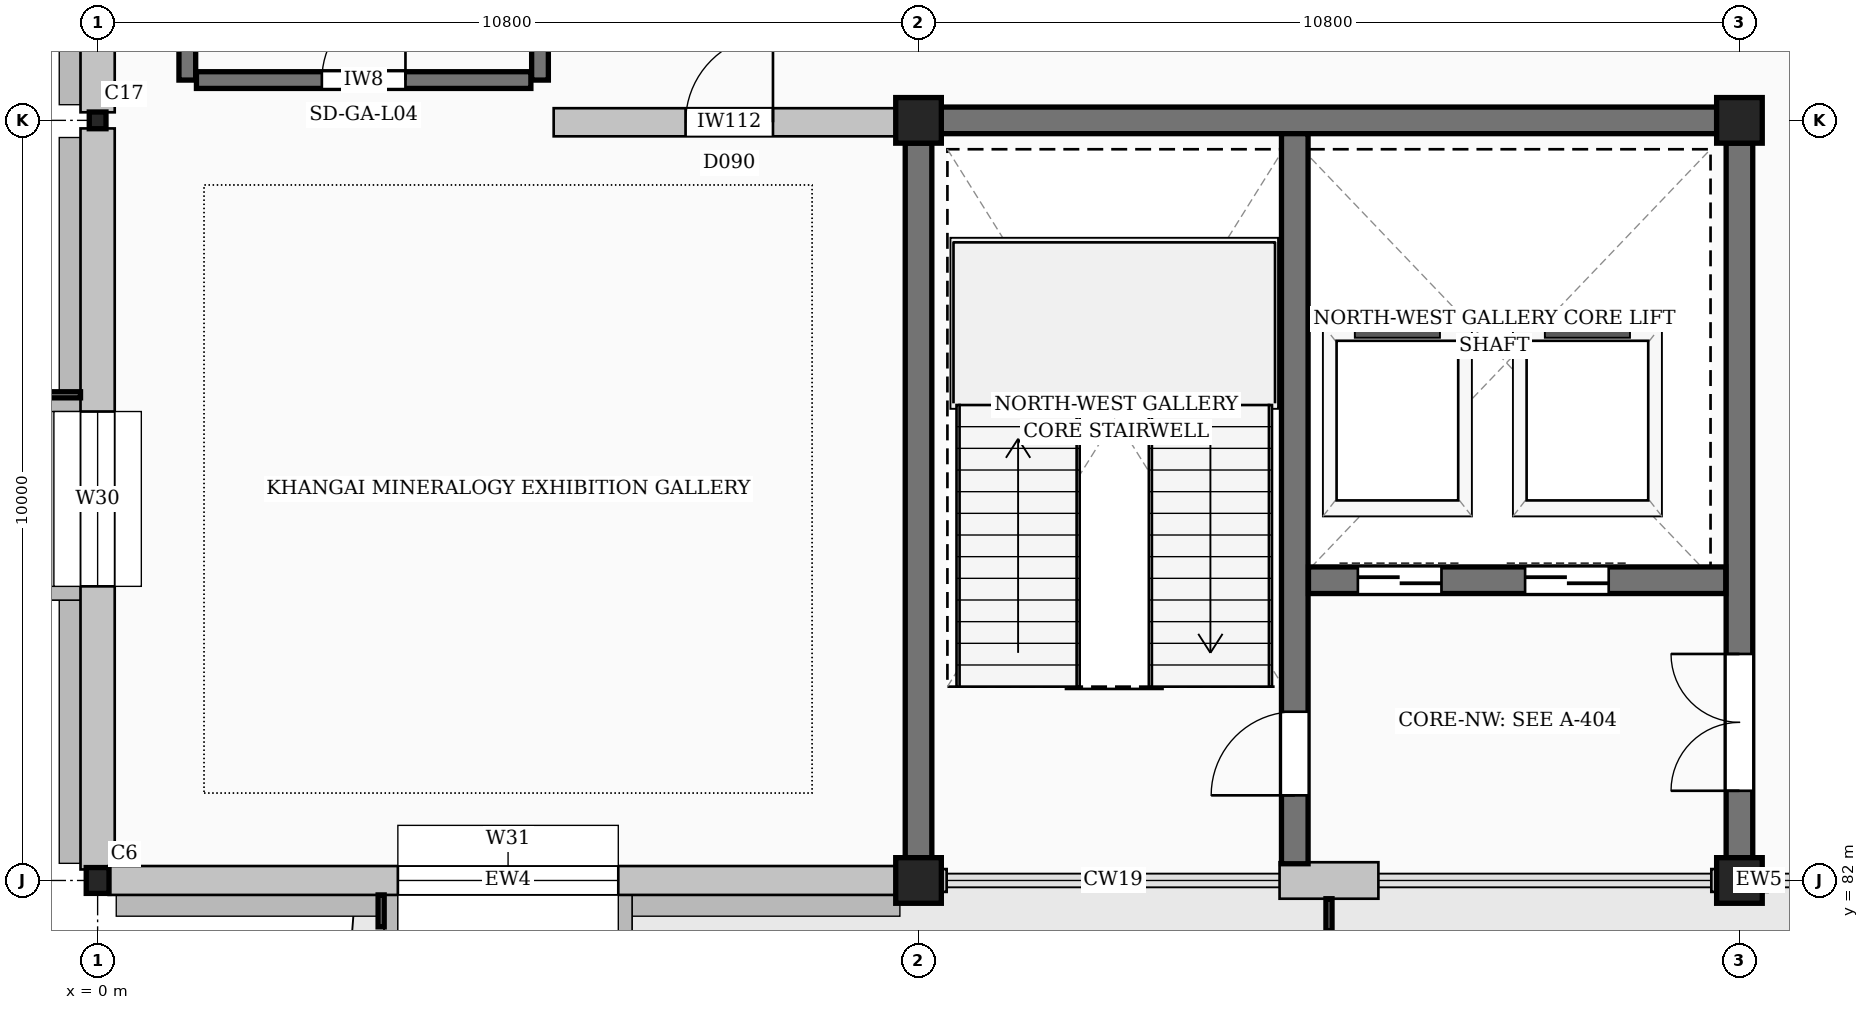
"""IFC4 building model, lengths in metres.
Left out: names, types, materials, properties, quantities, classifications, styles, units other than length and angle.
Written with IfcOpenShell. Run it as: python <this file> out.ifc"""

import sys

from ifc_helpers import new_model, si_unit, direction, frame, frame_2d, origin, origin_2d, place, context, subcontext, project, spatial, rectangle, hollow_rectangle, i_section, extrude, element, fill, save


model = new_model("IFC4")
c1 = context("Model", 3, precision=1e-05, world=origin(), true_north=direction((0.0, 1.0)))
c2 = subcontext(c1, "Body", "Model", "MODEL_VIEW")
j1 = project(units=[si_unit("LENGTHUNIT", "METRE"), si_unit("PLANEANGLEUNIT", "RADIAN")], contexts=[c1])
p1 = place(None, origin())
s1 = spatial("IfcSite", under=j1, at=p1, CompositionType="ELEMENT")
p2 = place(p1, origin())
s2 = spatial("IfcBuilding", under=s1, at=p2, CompositionType="ELEMENT")
p3 = place(p2, frame((0.0, 0.0, 24.0)))
s3 = spatial("IfcBuildingStorey", under=s2, at=p3, CompositionType="ELEMENT", Elevation=24.0)
p4 = place(p3, frame((0.0, 82.0, 0.0), z_axis=(0.0, 0.0, 1.0), x_axis=(1.0, 0.0, 0.0)))
e1 = element("IfcColumn", 1, at=p4, inside=s3, PredefinedType="COLUMN", context=c2, shape_type="SweptSolid", body=[
    extrude(i_section(OverallWidth=0.3, OverallDepth=0.34, WebThickness=0.012, FlangeThickness=0.021, FilletRadius=0.027, at=origin_2d()), origin(), (0.0, 0.0, 1.0), 4.8),
])
p5 = place(p3, frame((0.0, 92.0, 0.0), z_axis=(0.0, 0.0, 1.0), x_axis=(1.0, 0.0, 0.0)))
e2 = element("IfcColumn", 2, at=p5, inside=s3, PredefinedType="COLUMN", context=c2, shape_type="SweptSolid", body=[
    extrude(hollow_rectangle(XDim=0.22, YDim=0.22, WallThickness=0.012, InnerFilletRadius=0.012, OuterFilletRadius=0.025, at=origin_2d()), origin(), (0.0, 0.0, 1.0), 4.8),
])
for number, where, z_axis, x_axis in (
    (3, (10.8, 82.0, 0.0), (0.0, 0.0, 1.0), (1.0, 0.0, 0.0)),
    (4, (10.8, 92.0, 0.0), (0.0, 0.0, 1.0), (1.0, 0.0, 0.0)),
    (5, (21.6, 82.0, 0.0), (0.0, 0.0, 1.0), (1.0, 0.0, 0.0)),
    (6, (21.6, 92.0, 0.0), (0.0, 0.0, 1.0), (1.0, 0.0, 0.0)),
):
    element("IfcColumn", number, at=place(p3, frame(where, z_axis=z_axis, x_axis=x_axis)), inside=s3, PredefinedType="COLUMN", context=c2, shape_type="SweptSolid", body=[
        extrude(rectangle(XDim=0.6, YDim=0.6, at=origin_2d()), origin(), (0.0, 0.0, 1.0), 4.8),
    ])
p6 = place(p3, frame((0.0, 101.894, 0.0), z_axis=(0.0, 0.0, 1.0), x_axis=(0.0, -1.0, 0.0)))
e7 = element("IfcWall", 7, at=p6, inside=s3, PredefinedType="STANDARD", context=c2, shape_type="SweptSolid", body=[
    extrude(rectangle(XDim=9.788, YDim=0.45, at=frame_2d((4.894, 0.0))), origin(), (0.0, 0.0, 1.0), 4.56),
])
p7 = place(p6, frame((3.144, 0.0, 1.0)))
e8 = element("IfcOpeningElement", 8, at=p7, cuts=e7, PredefinedType="OPENING", context=c2, shape_type="SweptSolid", body=[
    extrude(rectangle(XDim=3.5, YDim=2.3, at=frame_2d((1.75, 1.15))), frame((0.0, 0.235, 0.0), z_axis=(0.0, -1.0, 0.0), x_axis=(1.0, 0.0, 0.0)), (0.0, 0.0, 1.0), 0.47),
])
p8 = place(p3, frame((0.0, 91.894, 0.0), z_axis=(0.0, 0.0, 1.0), x_axis=(0.0, -1.0, 0.0)))
e9 = element("IfcWall", 9, at=p8, inside=s3, PredefinedType="STANDARD", context=c2, shape_type="SweptSolid", body=[
    extrude(rectangle(XDim=9.749, YDim=0.45, at=frame_2d((4.875, 0.0))), origin(), (0.0, 0.0, 1.0), 4.56),
])
p9 = place(p8, frame((3.725, 0.0, 1.0)))
e10 = element("IfcOpeningElement", 10, at=p9, cuts=e9, PredefinedType="OPENING", context=c2, shape_type="SweptSolid", body=[
    extrude(rectangle(XDim=2.3, YDim=2.3, at=frame_2d((1.15, 1.15))), frame((0.0, 0.235, 0.0), z_axis=(0.0, -1.0, 0.0), x_axis=(1.0, 0.0, 0.0)), (0.0, 0.0, 1.0), 0.47),
])
p10 = place(p3, frame((0.145, 82.0, 0.0), z_axis=(0.0, 0.0, 1.0), x_axis=(1.0, 0.0, 0.0)))
e11 = element("IfcWall", 11, at=p10, inside=s3, PredefinedType="STANDARD", context=c2, shape_type="SweptSolid", body=[
    extrude(rectangle(XDim=10.51, YDim=0.38, at=frame_2d((5.255, 0.0))), origin(), (0.0, 0.0, 1.0), 4.17),
])
p11 = place(p10, frame((3.805, 0.0, 1.0)))
e12 = element("IfcOpeningElement", 12, at=p11, cuts=e11, PredefinedType="OPENING", context=c2, shape_type="SweptSolid", body=[
    extrude(rectangle(XDim=2.9, YDim=2.5, at=frame_2d((1.45, 1.25))), frame((0.0, 0.2, 0.0), z_axis=(0.0, -1.0, 0.0), x_axis=(1.0, 0.0, 0.0)), (0.0, 0.0, 1.0), 0.4),
])
p12 = place(p3, frame((15.55, 82.0, 0.0), z_axis=(0.0, 0.0, 1.0), x_axis=(1.0, 0.0, 0.0)))
e13 = element("IfcWall", 13, at=p12, inside=s3, PredefinedType="STANDARD", context=c2, shape_type="SweptSolid", body=[
    extrude(rectangle(XDim=1.3, YDim=0.48, at=frame_2d((0.65, 0.0))), origin(), (0.0, 0.0, 1.0), 4.17),
])
p13 = place(p3, frame((10.945, 82.0, 0.0), z_axis=(0.0, 0.0, 1.0), x_axis=(1.0, 0.0, 0.0)))
e14 = element("IfcWall", 14, at=p13, inside=s3, PredefinedType="STANDARD", context=c2, shape_type="SweptSolid", body=[
    extrude(rectangle(XDim=0.225, YDim=0.3, at=frame_2d((0.112, 0.0))), origin(), (0.0, 0.0, 1.0), 4.56),
])
p14 = place(p3, frame((21.23, 82.0, 0.0), z_axis=(0.0, 0.0, 1.0), x_axis=(1.0, 0.0, 0.0)))
e15 = element("IfcWall", 15, at=p14, inside=s3, PredefinedType="STANDARD", context=c2, shape_type="SweptSolid", body=[
    extrude(rectangle(XDim=0.225, YDim=0.3, at=frame_2d((0.113, 0.0))), origin(), (0.0, 0.0, 1.0), 4.56),
])
p15 = place(p3, frame((21.745, 82.0, 0.0), z_axis=(0.0, 0.0, 1.0), x_axis=(1.0, 0.0, 0.0)))
e16 = element("IfcWall", 16, at=p15, inside=s3, PredefinedType="STANDARD", context=c2, shape_type="SweptSolid", body=[
    extrude(rectangle(XDim=0.225, YDim=0.3, at=frame_2d((0.112, 0.0))), origin(), (0.0, 0.0, 1.0), 4.56),
])
p16 = place(p3, frame((11.1, 92.0, 0.0), z_axis=(0.0, 0.0, 1.0), x_axis=(1.0, 0.0, 0.0)))
e17 = element("IfcWall", 17, at=p16, inside=s3, PredefinedType="SHEAR", context=c2, shape_type="SweptSolid", body=[
    extrude(rectangle(XDim=10.2, YDim=0.35, at=frame_2d((5.1, 0.0))), origin(), (0.0, 0.0, 1.0), 4.56),
])
p17 = place(p3, frame((10.8, 82.3, 0.0), z_axis=(0.0, 0.0, 1.0), x_axis=(0.0, 1.0, 0.0)))
e18 = element("IfcWall", 18, at=p17, inside=s3, PredefinedType="SHEAR", context=c2, shape_type="SweptSolid", body=[
    extrude(rectangle(XDim=9.4, YDim=0.35, at=frame_2d((4.7, 0.0))), origin(), (0.0, 0.0, 1.0), 4.56),
])
p18 = place(p3, frame((21.6, 82.3, 0.0), z_axis=(0.0, 0.0, 1.0), x_axis=(0.0, 1.0, 0.0)))
e19 = element("IfcWall", 19, at=p18, inside=s3, PredefinedType="SHEAR", context=c2, shape_type="SweptSolid", body=[
    extrude(rectangle(XDim=9.4, YDim=0.35, at=frame_2d((4.7, 0.0))), origin(), (0.0, 0.0, 1.0), 4.56),
])
p19 = place(p18, frame((0.88, 0.0, 0.0)))
e20 = element("IfcOpeningElement", 20, at=p19, cuts=e19, PredefinedType="OPENING", context=c2, shape_type="SweptSolid", body=[
    extrude(rectangle(XDim=1.8, YDim=2.25, at=frame_2d((0.9, 1.125))), frame((0.0, 0.185, 0.0), z_axis=(0.0, -1.0, 0.0), x_axis=(1.0, 0.0, 0.0)), (0.0, 0.0, 1.0), 0.37),
])
p20 = place(p3, frame((15.75, 82.22, 0.0), z_axis=(0.0, 0.0, 1.0), x_axis=(0.0, 1.0, 0.0)))
e21 = element("IfcWall", 21, at=p20, inside=s3, PredefinedType="SHEAR", context=c2, shape_type="SweptSolid", body=[
    extrude(rectangle(XDim=9.605, YDim=0.35, at=frame_2d((4.802, 0.0))), origin(), (0.0, 0.0, 1.0), 4.56),
])
p21 = place(p20, frame((0.9, 0.0, 0.0)))
e22 = element("IfcOpeningElement", 22, at=p21, cuts=e21, PredefinedType="OPENING", context=c2, shape_type="SweptSolid", body=[
    extrude(rectangle(XDim=1.1, YDim=2.2, at=frame_2d((0.55, 1.1))), frame((0.0, 0.185, 0.0), z_axis=(0.0, -1.0, 0.0), x_axis=(1.0, 0.0, 0.0)), (0.0, 0.0, 1.0), 0.37),
])
p22 = place(p3, frame((15.93, 85.95, 0.0), z_axis=(0.0, 0.0, 1.0), x_axis=(1.0, 0.0, 0.0)))
e23 = element("IfcWall", 23, at=p22, inside=s3, PredefinedType="SHEAR", context=c2, shape_type="SweptSolid", body=[
    extrude(rectangle(XDim=5.49, YDim=0.35, at=frame_2d((2.745, 0.0))), origin(), (0.0, 0.0, 1.0), 4.56),
])
p23 = place(p22, frame((0.65, 0.0, 0.0)))
e24 = element("IfcOpeningElement", 24, at=p23, cuts=e23, PredefinedType="OPENING", context=c2, shape_type="SweptSolid", body=[
    extrude(rectangle(XDim=1.1, YDim=2.2, at=frame_2d((0.55, 1.1))), frame((0.0, 0.185, 0.0), z_axis=(0.0, -1.0, 0.0), x_axis=(1.0, 0.0, 0.0)), (0.0, 0.0, 1.0), 0.37),
])
p24 = place(p22, frame((2.85, 0.0, 0.0)))
e25 = element("IfcOpeningElement", 25, at=p24, cuts=e23, PredefinedType="OPENING", context=c2, shape_type="SweptSolid", body=[
    extrude(rectangle(XDim=1.1, YDim=2.2, at=frame_2d((0.55, 1.1))), frame((0.0, 0.185, 0.0), z_axis=(0.0, -1.0, 0.0), x_axis=(1.0, 0.0, 0.0)), (0.0, 0.0, 1.0), 0.37),
])
for number, where, z_axis, x_axis in (
    (26, (1.18, 92.53, 0.0), (0.0, 0.0, 1.0), (0.0, 1.0, 0.0)),
    (27, (5.82, 92.53, 0.0), (0.0, 0.0, 1.0), (0.0, 1.0, 0.0)),
):
    element("IfcWall", number, at=place(p3, frame(where, z_axis=z_axis, x_axis=x_axis)), inside=s3, PredefinedType="SHEAR", context=c2, shape_type="SweptSolid", body=[
        extrude(rectangle(XDim=9.14, YDim=0.22, at=frame_2d((4.57, 0.0))), origin(), (0.0, 0.0, 1.0), 4.56),
    ])
p25 = place(p3, frame((1.3, 92.53, 0.0), z_axis=(0.0, 0.0, 1.0), x_axis=(1.0, 0.0, 0.0)))
e28 = element("IfcWall", 28, at=p25, inside=s3, PredefinedType="SHEAR", context=c2, shape_type="SweptSolid", body=[
    extrude(rectangle(XDim=4.4, YDim=0.22, at=frame_2d((2.2, 0.0))), origin(), (0.0, 0.0, 1.0), 4.56),
])
p26 = place(p25, frame((1.65, 0.0, 0.0)))
e29 = element("IfcOpeningElement", 29, at=p26, cuts=e28, PredefinedType="OPENING", context=c2, shape_type="SweptSolid", body=[
    extrude(rectangle(XDim=1.1, YDim=2.2, at=frame_2d((0.55, 1.1))), frame((0.0, 0.12, 0.0), z_axis=(0.0, -1.0, 0.0), x_axis=(1.0, 0.0, 0.0)), (0.0, 0.0, 1.0), 0.24),
])
p27 = place(p3, frame((6.0, 91.975, 0.0), z_axis=(0.0, 0.0, 1.0), x_axis=(1.0, 0.0, 0.0)))
e30 = element("IfcWall", 30, at=p27, inside=s3, PredefinedType="PARTITIONING", context=c2, shape_type="SweptSolid", body=[
    extrude(rectangle(XDim=4.62, YDim=0.37, at=frame_2d((2.31, 0.0))), origin(), (0.0, 0.0, 1.0), 4.17),
])
p28 = place(p27, frame((1.735, 0.0, 0.0)))
e31 = element("IfcOpeningElement", 31, at=p28, cuts=e30, PredefinedType="OPENING", context=c2, shape_type="SweptSolid", body=[
    extrude(rectangle(XDim=1.15, YDim=2.25, at=frame_2d((0.575, 1.125))), frame((0.0, 0.195, 0.0), z_axis=(0.0, -1.0, 0.0), x_axis=(1.0, 0.0, 0.0)), (0.0, 0.0, 1.0), 0.39),
])
p29 = place(p9, origin())
e32 = element("IfcWindow", 32, at=p29, inside=s3, PartitioningType="SINGLE_PANEL", PredefinedType="WINDOW", context=c2, shape_type="SweptSolid", body=[
    extrude(rectangle(XDim=2.3, YDim=2.3, at=frame_2d((1.15, 1.15))), frame((0.0, 0.03, 0.0), z_axis=(0.0, -1.0, 0.0), x_axis=(1.0, 0.0, 0.0)), (0.0, 0.0, 1.0), 0.06),
])
fill(e10, e32)
p30 = place(p11, origin())
e33 = element("IfcWindow", 33, at=p30, inside=s3, PartitioningType="SINGLE_PANEL", PredefinedType="WINDOW", context=c2, shape_type="SweptSolid", body=[
    extrude(rectangle(XDim=2.9, YDim=2.5, at=frame_2d((1.45, 1.25))), frame((0.0, 0.03, 0.0), z_axis=(0.0, -1.0, 0.0), x_axis=(1.0, 0.0, 0.0)), (0.0, 0.0, 1.0), 0.06),
])
fill(e12, e33)
p31 = place(p21, origin())
e34 = element("IfcDoor", 34, at=p31, inside=s3, OperationType="SINGLE_SWING_LEFT", PredefinedType="DOOR", context=c2, shape_type="SweptSolid", body=[
    extrude(rectangle(XDim=1.1, YDim=2.2, at=frame_2d((0.55, 1.1))), frame((0.0, 0.025, 0.0), z_axis=(0.0, -1.0, 0.0), x_axis=(1.0, 0.0, 0.0)), (0.0, 0.0, 1.0), 0.05),
])
fill(e22, e34)
p32 = place(p19, origin())
e35 = element("IfcDoor", 35, at=p32, inside=s3, OperationType="DOUBLE_DOOR_SINGLE_SWING", PredefinedType="DOOR", context=c2, shape_type="SweptSolid", body=[
    extrude(rectangle(XDim=1.8, YDim=2.25, at=frame_2d((0.9, 1.125))), frame((0.0, 0.025, 0.0), z_axis=(0.0, -1.0, 0.0), x_axis=(1.0, 0.0, 0.0)), (0.0, 0.0, 1.0), 0.05),
])
fill(e20, e35)
p33 = place(p23, origin())
e36 = element("IfcDoor", 36, at=p33, inside=s3, OperationType="DOUBLE_DOOR_SLIDING", PredefinedType="DOOR", context=c2, shape_type="SweptSolid", body=[
    extrude(rectangle(XDim=1.1, YDim=2.2, at=frame_2d((0.55, 1.1))), frame((0.0, 0.025, 0.0), z_axis=(0.0, -1.0, 0.0), x_axis=(1.0, 0.0, 0.0)), (0.0, 0.0, 1.0), 0.05),
])
fill(e24, e36)
p34 = place(p24, origin())
e37 = element("IfcDoor", 37, at=p34, inside=s3, OperationType="DOUBLE_DOOR_SLIDING", PredefinedType="DOOR", context=c2, shape_type="SweptSolid", body=[
    extrude(rectangle(XDim=1.1, YDim=2.2, at=frame_2d((0.55, 1.1))), frame((0.0, 0.025, 0.0), z_axis=(0.0, -1.0, 0.0), x_axis=(1.0, 0.0, 0.0)), (0.0, 0.0, 1.0), 0.05),
])
fill(e25, e37)
p35 = place(p26, origin())
e38 = element("IfcDoor", 38, at=p35, inside=s3, OperationType="SINGLE_SWING_RIGHT", PredefinedType="DOOR", context=c2, shape_type="SweptSolid", body=[
    extrude(rectangle(XDim=1.1, YDim=2.2, at=frame_2d((0.55, 1.1))), frame((0.0, 0.025, 0.0), z_axis=(0.0, -1.0, 0.0), x_axis=(1.0, 0.0, 0.0)), (0.0, 0.0, 1.0), 0.05),
])
fill(e29, e38)
p36 = place(p28, origin())
e39 = element("IfcDoor", 39, at=p36, inside=s3, OperationType="SINGLE_SWING_RIGHT", PredefinedType="DOOR", context=c2, shape_type="SweptSolid", body=[
    extrude(rectangle(XDim=1.15, YDim=2.25, at=frame_2d((0.575, 1.125))), frame((0.0, 0.025, 0.0), z_axis=(0.0, -1.0, 0.0), x_axis=(1.0, 0.0, 0.0)), (0.0, 0.0, 1.0), 0.05),
])
fill(e31, e39)
save(model, sys.argv[1])
